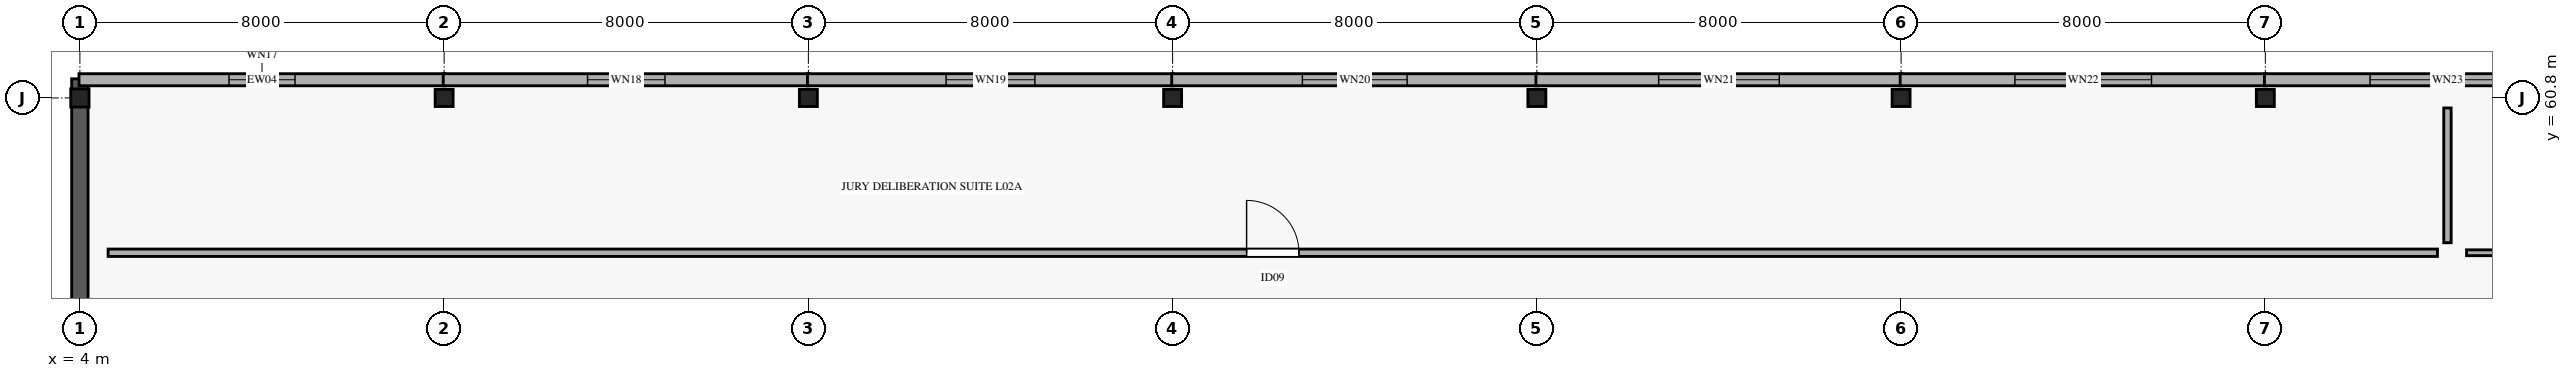
"""IFC4 building model, lengths in metres.
Left out: names, types, materials, properties, quantities, classifications, styles, units other than length and angle.
Written with IfcOpenShell. Run it as: python <this file> out.ifc"""

import sys

from ifc_helpers import new_model, si_unit, direction, frame, frame_2d, origin, origin_2d, place, context, subcontext, project, spatial, rectangle, i_section, extrude, element, fill, save


model = new_model("IFC4")
c1 = context("Model", 3, precision=1e-05, world=origin(), true_north=direction((0.0, 1.0)))
c2 = subcontext(c1, "Body", "Model", "MODEL_VIEW")
j1 = project(units=[si_unit("LENGTHUNIT", "METRE"), si_unit("PLANEANGLEUNIT", "RADIAN")], contexts=[c1])
p1 = place(None, origin())
s1 = spatial("IfcSite", under=j1, at=p1, CompositionType="ELEMENT")
p2 = place(p1, origin())
s2 = spatial("IfcBuilding", under=s1, at=p2, CompositionType="ELEMENT")
p3 = place(p2, frame((0.0, 0.0, 10.8)))
s3 = spatial("IfcBuildingStorey", under=s2, at=p3, CompositionType="ELEMENT", Elevation=10.8)
p4 = place(p3, frame((4.0, 60.8, 0.0), z_axis=(0.0, 0.0, 1.0), x_axis=(1.0, 0.0, 0.0)))
e1 = element("IfcColumn", 1, at=p4, inside=s3, PredefinedType="COLUMN", context=c2, shape_type="SweptSolid", body=[
    extrude(i_section(OverallWidth=0.401, OverallDepth=0.399, WebThickness=0.025, FlangeThickness=0.04, FilletRadius=0.015, at=origin_2d()), origin(), (0.0, 0.0, 1.0), 4.59),
])
for number, where, z_axis, x_axis in (
    (2, (12.0, 60.8, 0.0), (0.0, 0.0, 1.0), (1.0, 0.0, 0.0)),
    (3, (20.0, 60.8, 0.0), (0.0, 0.0, 1.0), (1.0, 0.0, 0.0)),
    (4, (28.0, 60.8, 0.0), (0.0, 0.0, 1.0), (1.0, 0.0, 0.0)),
    (5, (36.0, 60.8, 0.0), (0.0, 0.0, 1.0), (1.0, 0.0, 0.0)),
    (6, (44.0, 60.8, 0.0), (0.0, 0.0, 1.0), (1.0, 0.0, 0.0)),
    (7, (52.0, 60.8, 0.0), (0.0, 0.0, 1.0), (1.0, 0.0, 0.0)),
):
    element("IfcColumn", number, at=place(p3, frame(where, z_axis=z_axis, x_axis=x_axis)), inside=s3, PredefinedType="COLUMN", context=c2, shape_type="SweptSolid", body=[
        extrude(i_section(OverallWidth=0.394, OverallDepth=0.376, WebThickness=0.017, FlangeThickness=0.028, FilletRadius=0.015, at=origin_2d()), origin(), (0.0, 0.0, 1.0), 4.59),
    ])
p5 = place(p3, frame((4.0, 53.18, 0.0), z_axis=(0.0, 0.0, 1.0), x_axis=(0.0, 1.0, 0.0)))
e8 = element("IfcWall", 8, at=p5, inside=s3, PredefinedType="STANDARD", context=c2, shape_type="SweptSolid", body=[
    extrude(rectangle(XDim=8.04, YDim=0.36, at=frame_2d((4.02, 0.0))), origin(), (0.0, 0.0, 1.0), 4.6),
])
p6 = place(p3, frame((3.98, 61.2, 0.0), z_axis=(0.0, 0.0, 1.0), x_axis=(1.0, 0.0, 0.0)))
e9 = element("IfcWall", 9, at=p6, inside=s3, PredefinedType="STANDARD", context=c2, shape_type="SweptSolid", body=[
    extrude(rectangle(XDim=8.04, YDim=0.265, at=frame_2d((4.02, 0.0))), origin(), (0.0, 0.0, 1.0), 3.66),
])
p7 = place(p6, frame((3.295, 0.0, 0.75)))
e10 = element("IfcOpeningElement", 10, at=p7, cuts=e9, PredefinedType="OPENING", context=c2, shape_type="SweptSolid", body=[
    extrude(rectangle(XDim=1.45, YDim=1.8, at=frame_2d((0.725, 0.9))), frame((0.0, 0.142, 0.0), z_axis=(0.0, -1.0, 0.0), x_axis=(1.0, 0.0, 0.0)), (0.0, 0.0, 1.0), 0.285),
])
p8 = place(p3, frame((11.98, 61.2, 0.0), z_axis=(0.0, 0.0, 1.0), x_axis=(1.0, 0.0, 0.0)))
e11 = element("IfcWall", 11, at=p8, inside=s3, PredefinedType="STANDARD", context=c2, shape_type="SweptSolid", body=[
    extrude(rectangle(XDim=8.04, YDim=0.265, at=frame_2d((4.02, 0.0))), origin(), (0.0, 0.0, 1.0), 3.66),
])
p9 = place(p8, frame((3.17, 0.0, 0.75)))
e12 = element("IfcOpeningElement", 12, at=p9, cuts=e11, PredefinedType="OPENING", context=c2, shape_type="SweptSolid", body=[
    extrude(rectangle(XDim=1.7, YDim=1.8, at=frame_2d((0.85, 0.9))), frame((0.0, 0.142, 0.0), z_axis=(0.0, -1.0, 0.0), x_axis=(1.0, 0.0, 0.0)), (0.0, 0.0, 1.0), 0.285),
])
p10 = place(p3, frame((19.98, 61.2, 0.0), z_axis=(0.0, 0.0, 1.0), x_axis=(1.0, 0.0, 0.0)))
e13 = element("IfcWall", 13, at=p10, inside=s3, PredefinedType="STANDARD", context=c2, shape_type="SweptSolid", body=[
    extrude(rectangle(XDim=8.04, YDim=0.265, at=frame_2d((4.02, 0.0))), origin(), (0.0, 0.0, 1.0), 3.66),
])
p11 = place(p10, frame((3.045, 0.0, 0.75)))
e14 = element("IfcOpeningElement", 14, at=p11, cuts=e13, PredefinedType="OPENING", context=c2, shape_type="SweptSolid", body=[
    extrude(rectangle(XDim=1.95, YDim=1.8, at=frame_2d((0.975, 0.9))), frame((0.0, 0.142, 0.0), z_axis=(0.0, -1.0, 0.0), x_axis=(1.0, 0.0, 0.0)), (0.0, 0.0, 1.0), 0.285),
])
p12 = place(p3, frame((27.98, 61.2, 0.0), z_axis=(0.0, 0.0, 1.0), x_axis=(1.0, 0.0, 0.0)))
e15 = element("IfcWall", 15, at=p12, inside=s3, PredefinedType="STANDARD", context=c2, shape_type="SweptSolid", body=[
    extrude(rectangle(XDim=8.04, YDim=0.265, at=frame_2d((4.02, 0.0))), origin(), (0.0, 0.0, 1.0), 3.66),
])
p13 = place(p12, frame((2.87, 0.0, 0.75)))
e16 = element("IfcOpeningElement", 16, at=p13, cuts=e15, PredefinedType="OPENING", context=c2, shape_type="SweptSolid", body=[
    extrude(rectangle(XDim=2.3, YDim=1.8, at=frame_2d((1.15, 0.9))), frame((0.0, 0.142, 0.0), z_axis=(0.0, -1.0, 0.0), x_axis=(1.0, 0.0, 0.0)), (0.0, 0.0, 1.0), 0.285),
])
p14 = place(p3, frame((35.98, 61.2, 0.0), z_axis=(0.0, 0.0, 1.0), x_axis=(1.0, 0.0, 0.0)))
e17 = element("IfcWall", 17, at=p14, inside=s3, PredefinedType="STANDARD", context=c2, shape_type="SweptSolid", body=[
    extrude(rectangle(XDim=8.04, YDim=0.265, at=frame_2d((4.02, 0.0))), origin(), (0.0, 0.0, 1.0), 3.66),
])
p15 = place(p14, frame((2.695, 0.0, 0.75)))
e18 = element("IfcOpeningElement", 18, at=p15, cuts=e17, PredefinedType="OPENING", context=c2, shape_type="SweptSolid", body=[
    extrude(rectangle(XDim=2.65, YDim=1.8, at=frame_2d((1.325, 0.9))), frame((0.0, 0.142, 0.0), z_axis=(0.0, -1.0, 0.0), x_axis=(1.0, 0.0, 0.0)), (0.0, 0.0, 1.0), 0.285),
])
p16 = place(p3, frame((43.98, 61.2, 0.0), z_axis=(0.0, 0.0, 1.0), x_axis=(1.0, 0.0, 0.0)))
e19 = element("IfcWall", 19, at=p16, inside=s3, PredefinedType="STANDARD", context=c2, shape_type="SweptSolid", body=[
    extrude(rectangle(XDim=8.04, YDim=0.265, at=frame_2d((4.02, 0.0))), origin(), (0.0, 0.0, 1.0), 3.66),
])
p17 = place(p16, frame((2.52, 0.0, 0.75)))
e20 = element("IfcOpeningElement", 20, at=p17, cuts=e19, PredefinedType="OPENING", context=c2, shape_type="SweptSolid", body=[
    extrude(rectangle(XDim=3.0, YDim=1.8, at=frame_2d((1.5, 0.9))), frame((0.0, 0.142, 0.0), z_axis=(0.0, -1.0, 0.0), x_axis=(1.0, 0.0, 0.0)), (0.0, 0.0, 1.0), 0.285),
])
p18 = place(p3, frame((51.98, 61.2, 0.0), z_axis=(0.0, 0.0, 1.0), x_axis=(1.0, 0.0, 0.0)))
e21 = element("IfcWall", 21, at=p18, inside=s3, PredefinedType="STANDARD", context=c2, shape_type="SweptSolid", body=[
    extrude(rectangle(XDim=8.04, YDim=0.265, at=frame_2d((4.02, 0.0))), origin(), (0.0, 0.0, 1.0), 3.66),
])
p19 = place(p18, frame((2.32, 0.0, 0.75)))
e22 = element("IfcOpeningElement", 22, at=p19, cuts=e21, PredefinedType="OPENING", context=c2, shape_type="SweptSolid", body=[
    extrude(rectangle(XDim=3.4, YDim=1.8, at=frame_2d((1.7, 0.9))), frame((0.0, 0.142, 0.0), z_axis=(0.0, -1.0, 0.0), x_axis=(1.0, 0.0, 0.0)), (0.0, 0.0, 1.0), 0.285),
])
p20 = place(p3, frame((4.62, 57.4, 0.0), z_axis=(0.0, 0.0, 1.0), x_axis=(1.0, 0.0, 0.0)))
e23 = element("IfcWall", 23, at=p20, inside=s3, PredefinedType="PARTITIONING", context=c2, shape_type="SweptSolid", body=[
    extrude(rectangle(XDim=51.16, YDim=0.162, at=frame_2d((25.58, 0.0))), origin(), (0.0, 0.0, 1.0), 3.45),
])
p21 = place(p20, frame((25.005, 0.0, 0.0)))
e24 = element("IfcOpeningElement", 24, at=p21, cuts=e23, PredefinedType="OPENING", context=c2, shape_type="SweptSolid", body=[
    extrude(rectangle(XDim=1.15, YDim=2.15, at=frame_2d((0.575, 1.075))), frame((0.0, 0.091, 0.0), z_axis=(0.0, -1.0, 0.0), x_axis=(1.0, 0.0, 0.0)), (0.0, 0.0, 1.0), 0.182),
])
p22 = place(p3, frame((56.0, 57.62, 0.0), z_axis=(0.0, 0.0, 1.0), x_axis=(0.0, 1.0, 0.0)))
e25 = element("IfcWall", 25, at=p22, inside=s3, PredefinedType="PARTITIONING", context=c2, shape_type="SweptSolid", body=[
    extrude(rectangle(XDim=2.96, YDim=0.162, at=frame_2d((1.48, 0.0))), origin(), (0.0, 0.0, 1.0), 3.45),
])
p23 = place(p3, frame((56.42, 57.4, 0.0), z_axis=(0.0, 0.0, 1.0), x_axis=(1.0, 0.0, 0.0)))
e26 = element("IfcWall", 26, at=p23, inside=s3, PredefinedType="PARTITIONING", context=c2, shape_type="SweptSolid", body=[
    extrude(rectangle(XDim=10.96, YDim=0.128, at=frame_2d((5.48, 0.0))), origin(), (0.0, 0.0, 1.0), 3.45),
])
p24 = place(p23, frame((4.955, 0.0, 0.0)))
e27 = element("IfcOpeningElement", 27, at=p24, cuts=e26, PredefinedType="OPENING", context=c2, shape_type="SweptSolid", body=[
    extrude(rectangle(XDim=1.05, YDim=2.15, at=frame_2d((0.525, 1.075))), frame((0.0, 0.074, 0.0), z_axis=(0.0, -1.0, 0.0), x_axis=(1.0, 0.0, 0.0)), (0.0, 0.0, 1.0), 0.148),
])
p25 = place(p7, origin())
e28 = element("IfcWindow", 28, at=p25, inside=s3, PartitioningType="SINGLE_PANEL", PredefinedType="WINDOW", context=c2, shape_type="SweptSolid", body=[
    extrude(rectangle(XDim=1.45, YDim=1.8, at=frame_2d((0.725, 0.9))), frame((0.0, 0.03, 0.0), z_axis=(0.0, -1.0, 0.0), x_axis=(1.0, 0.0, 0.0)), (0.0, 0.0, 1.0), 0.06),
])
fill(e10, e28)
p26 = place(p9, origin())
e29 = element("IfcWindow", 29, at=p26, inside=s3, PartitioningType="SINGLE_PANEL", PredefinedType="WINDOW", context=c2, shape_type="SweptSolid", body=[
    extrude(rectangle(XDim=1.7, YDim=1.8, at=frame_2d((0.85, 0.9))), frame((0.0, 0.03, 0.0), z_axis=(0.0, -1.0, 0.0), x_axis=(1.0, 0.0, 0.0)), (0.0, 0.0, 1.0), 0.06),
])
fill(e12, e29)
p27 = place(p11, origin())
e30 = element("IfcWindow", 30, at=p27, inside=s3, PartitioningType="SINGLE_PANEL", PredefinedType="WINDOW", context=c2, shape_type="SweptSolid", body=[
    extrude(rectangle(XDim=1.95, YDim=1.8, at=frame_2d((0.975, 0.9))), frame((0.0, 0.03, 0.0), z_axis=(0.0, -1.0, 0.0), x_axis=(1.0, 0.0, 0.0)), (0.0, 0.0, 1.0), 0.06),
])
fill(e14, e30)
p28 = place(p13, origin())
e31 = element("IfcWindow", 31, at=p28, inside=s3, PartitioningType="SINGLE_PANEL", PredefinedType="WINDOW", context=c2, shape_type="SweptSolid", body=[
    extrude(rectangle(XDim=2.3, YDim=1.8, at=frame_2d((1.15, 0.9))), frame((0.0, 0.03, 0.0), z_axis=(0.0, -1.0, 0.0), x_axis=(1.0, 0.0, 0.0)), (0.0, 0.0, 1.0), 0.06),
])
fill(e16, e31)
p29 = place(p15, origin())
e32 = element("IfcWindow", 32, at=p29, inside=s3, PartitioningType="SINGLE_PANEL", PredefinedType="WINDOW", context=c2, shape_type="SweptSolid", body=[
    extrude(rectangle(XDim=2.65, YDim=1.8, at=frame_2d((1.325, 0.9))), frame((0.0, 0.03, 0.0), z_axis=(0.0, -1.0, 0.0), x_axis=(1.0, 0.0, 0.0)), (0.0, 0.0, 1.0), 0.06),
])
fill(e18, e32)
p30 = place(p17, origin())
e33 = element("IfcWindow", 33, at=p30, inside=s3, PartitioningType="SINGLE_PANEL", PredefinedType="WINDOW", context=c2, shape_type="SweptSolid", body=[
    extrude(rectangle(XDim=3.0, YDim=1.8, at=frame_2d((1.5, 0.9))), frame((0.0, 0.03, 0.0), z_axis=(0.0, -1.0, 0.0), x_axis=(1.0, 0.0, 0.0)), (0.0, 0.0, 1.0), 0.06),
])
fill(e20, e33)
p31 = place(p19, origin())
e34 = element("IfcWindow", 34, at=p31, inside=s3, PartitioningType="SINGLE_PANEL", PredefinedType="WINDOW", context=c2, shape_type="SweptSolid", body=[
    extrude(rectangle(XDim=3.4, YDim=1.8, at=frame_2d((1.7, 0.9))), frame((0.0, 0.03, 0.0), z_axis=(0.0, -1.0, 0.0), x_axis=(1.0, 0.0, 0.0)), (0.0, 0.0, 1.0), 0.06),
])
fill(e22, e34)
p32 = place(p21, origin())
e35 = element("IfcDoor", 35, at=p32, inside=s3, OperationType="SINGLE_SWING_LEFT", PredefinedType="DOOR", context=c2, shape_type="SweptSolid", body=[
    extrude(rectangle(XDim=1.15, YDim=2.15, at=frame_2d((0.575, 1.075))), frame((0.0, 0.025, 0.0), z_axis=(0.0, -1.0, 0.0), x_axis=(1.0, 0.0, 0.0)), (0.0, 0.0, 1.0), 0.05),
])
fill(e24, e35)
save(model, sys.argv[1])
